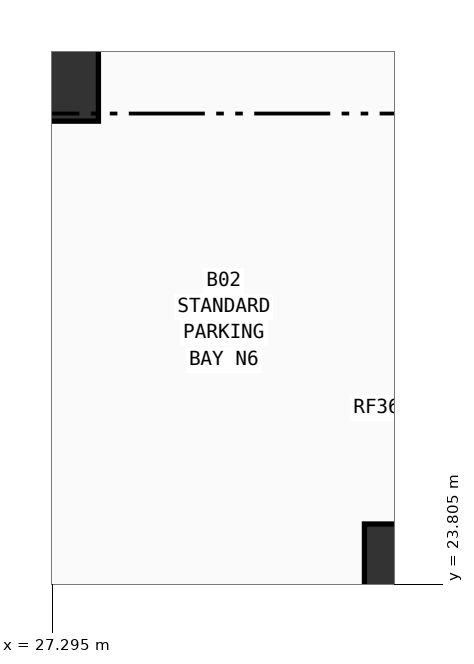
"""IFC4 building model, lengths in metres.
Left out: names, types, materials, properties, quantities, classifications, styles, units other than length and angle.
Written with IfcOpenShell. Run it as: python <this file> out.ifc"""

import sys

from ifc_helpers import new_model, si_unit, direction, frame, origin, origin_2d, place, context, subcontext, project, spatial, rectangle, circle, extrude, element, save


model = new_model("IFC4")
c1 = context("Model", 3, precision=1e-05, world=origin(), true_north=direction((0.0, 1.0)))
c2 = subcontext(c1, "Body", "Model", "MODEL_VIEW")
j1 = project(units=[si_unit("LENGTHUNIT", "METRE"), si_unit("PLANEANGLEUNIT", "RADIAN")], contexts=[c1])
p1 = place(None, origin())
s1 = spatial("IfcSite", under=j1, at=p1, CompositionType="ELEMENT")
p2 = place(p1, origin())
s2 = spatial("IfcBuilding", under=s1, at=p2, CompositionType="ELEMENT")
p3 = place(p2, frame((0.0, 0.0, -8.4)))
s3 = spatial("IfcBuildingStorey", under=s2, at=p3, CompositionType="ELEMENT", Elevation=-8.4)
p4 = place(p3, frame((27.2, 30.6, 0.0), z_axis=(0.0, 0.0, 1.0), x_axis=(1.0, 0.0, 0.0)))
e1 = element("IfcColumn", 1, at=p4, inside=s3, PredefinedType="COLUMN", context=c2, shape_type="SweptSolid", body=[
    extrude(rectangle(XDim=1.4, YDim=1.4, at=origin_2d()), origin(), (0.0, 0.0, 1.0), 3.86),
])
p5 = place(p3, frame((32.0, 24.0, 0.0), z_axis=(0.0, 0.0, 1.0), x_axis=(1.0, 0.0, 0.0)))
e2 = element("IfcColumn", 2, at=p5, inside=s3, PredefinedType="COLUMN", context=c2, shape_type="SweptSolid", body=[
    extrude(circle(Radius=0.6, at=origin_2d()), origin(), (0.0, 0.0, 1.0), 3.86),
])
save(model, sys.argv[1])
